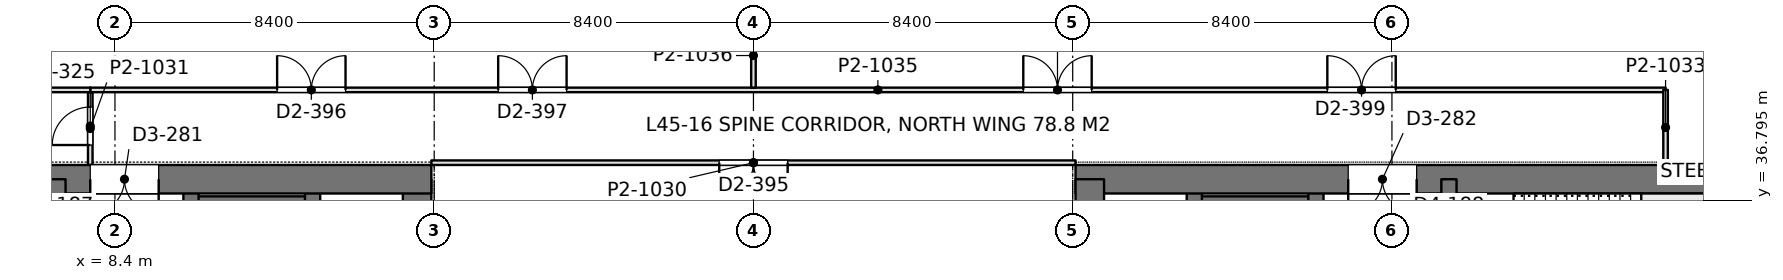
"""IFC4 building model, lengths in metres.
Left out: names, types, materials, properties, quantities, classifications, styles, units other than length and angle.
Written with IfcOpenShell. Run it as: python <this file> out.ifc"""

import sys

from ifc_helpers import new_model, si_unit, direction, frame, frame_2d, origin, place, context, subcontext, project, spatial, rectangle, extrude, element, fill, save


model = new_model("IFC4")
c1 = context("Model", 3, precision=1e-05, world=origin(), true_north=direction((0.0, 1.0)))
c2 = subcontext(c1, "Body", "Model", "MODEL_VIEW")
j1 = project(units=[si_unit("LENGTHUNIT", "METRE"), si_unit("PLANEANGLEUNIT", "RADIAN")], contexts=[c1])
p1 = place(None, origin())
s1 = spatial("IfcSite", under=j1, at=p1, CompositionType="ELEMENT")
p2 = place(p1, origin())
s2 = spatial("IfcBuilding", under=s1, at=p2, CompositionType="ELEMENT")
p3 = place(p2, frame((0.0, 0.0, 198.6)))
s3 = spatial("IfcBuildingStorey", under=s2, at=p3, CompositionType="ELEMENT", Elevation=198.6)
p4 = place(p3, frame((-1.125, 37.35, 0.0), z_axis=(0.0, 0.0, 1.0), x_axis=(1.0, 0.0, 0.0)))
e1 = element("IfcWall", 1, at=p4, inside=s3, PredefinedType="SHEAR", context=c2, shape_type="SweptSolid", body=[
    extrude(rectangle(XDim=17.85, YDim=0.75, at=frame_2d((8.925, 0.0))), origin(), (0.0, 0.0, 1.0), 4.2),
])
p5 = place(p4, frame((8.875, 0.0, 0.0)))
e2 = element("IfcOpeningElement", 2, at=p5, cuts=e1, PredefinedType="OPENING", context=c2, shape_type="SweptSolid", body=[
    extrude(rectangle(XDim=1.8, YDim=2.4, at=frame_2d((0.9, 1.2))), frame((0.0, 0.385, 0.0), z_axis=(0.0, -1.0, 0.0), x_axis=(1.0, 0.0, 0.0)), (0.0, 0.0, 1.0), 0.77),
])
p6 = place(p3, frame((16.35, 27.8, 0.0), z_axis=(0.0, 0.0, 1.0), x_axis=(0.0, 1.0, 0.0)))
e3 = element("IfcWall", 3, at=p6, inside=s3, PredefinedType="SHEAR", context=c2, shape_type="SweptSolid", body=[
    extrude(rectangle(XDim=9.55, YDim=0.75, at=frame_2d((4.775, 0.0))), origin(), (0.0, 0.0, 1.0), 4.2),
])
p7 = place(p3, frame((6.9, 13.05, 0.0), z_axis=(0.0, 0.0, 1.0), x_axis=(0.0, 1.0, 0.0)))
e4 = element("IfcWall", 4, at=p7, inside=s3, PredefinedType="SHEAR", context=c2, shape_type="SweptSolid", body=[
    extrude(rectangle(XDim=24.3, YDim=0.4, at=frame_2d((12.15, 0.0))), origin(), (0.0, 0.0, 1.0), 4.2),
])
p8 = place(p7, frame((1.3, 0.0, 0.0)))
e5 = element("IfcOpeningElement", 5, at=p8, cuts=e4, PredefinedType="OPENING", context=c2, shape_type="SweptSolid", body=[
    extrude(rectangle(XDim=1.0, YDim=2.2, at=frame_2d((0.5, 1.1))), frame((0.0, 0.21, 0.0), z_axis=(0.0, -1.0, 0.0), x_axis=(1.0, 0.0, 0.0)), (0.0, 0.0, 1.0), 0.42),
])
p9 = place(p7, frame((22.0, 0.0, 0.0)))
e6 = element("IfcOpeningElement", 6, at=p9, cuts=e4, PredefinedType="OPENING", context=c2, shape_type="SweptSolid", body=[
    extrude(rectangle(XDim=1.0, YDim=2.2, at=frame_2d((0.5, 1.1))), frame((0.0, 0.21, 0.0), z_axis=(0.0, -1.0, 0.0), x_axis=(1.0, 0.0, 0.0)), (0.0, 0.0, 1.0), 0.42),
])
p10 = place(p7, frame((5.55, 0.0, 0.0)))
e7 = element("IfcOpeningElement", 7, at=p10, cuts=e4, PredefinedType="OPENING", context=c2, shape_type="SweptSolid", body=[
    extrude(rectangle(XDim=1.0, YDim=2.2, at=frame_2d((0.5, 1.1))), frame((0.0, 0.21, 0.0), z_axis=(0.0, -1.0, 0.0), x_axis=(1.0, 0.0, 0.0)), (0.0, 0.0, 1.0), 0.42),
])
p11 = place(p7, frame((9.55, 0.0, 0.0)))
e8 = element("IfcOpeningElement", 8, at=p11, cuts=e4, PredefinedType="OPENING", context=c2, shape_type="SweptSolid", body=[
    extrude(rectangle(XDim=1.0, YDim=2.2, at=frame_2d((0.5, 1.1))), frame((0.0, 0.21, 0.0), z_axis=(0.0, -1.0, 0.0), x_axis=(1.0, 0.0, 0.0)), (0.0, 0.0, 1.0), 0.42),
])
p12 = place(p7, frame((12.8, 0.0, 0.0)))
e9 = element("IfcOpeningElement", 9, at=p12, cuts=e4, PredefinedType="OPENING", context=c2, shape_type="SweptSolid", body=[
    extrude(rectangle(XDim=1.1, YDim=2.2, at=frame_2d((0.55, 1.1))), frame((0.0, 0.21, 0.0), z_axis=(0.0, -1.0, 0.0), x_axis=(1.0, 0.0, 0.0)), (0.0, 0.0, 1.0), 0.42),
])
p13 = place(p7, frame((15.538, 0.0, 0.0)))
e10 = element("IfcOpeningElement", 10, at=p13, cuts=e4, PredefinedType="OPENING", context=c2, shape_type="SweptSolid", body=[
    extrude(rectangle(XDim=1.1, YDim=2.2, at=frame_2d((0.55, 1.1))), frame((0.0, 0.21, 0.0), z_axis=(0.0, -1.0, 0.0), x_axis=(1.0, 0.0, 0.0)), (0.0, 0.0, 1.0), 0.42),
])
p14 = place(p7, frame((18.262, 0.0, 0.0)))
e11 = element("IfcOpeningElement", 11, at=p14, cuts=e4, PredefinedType="OPENING", context=c2, shape_type="SweptSolid", body=[
    extrude(rectangle(XDim=1.1, YDim=2.2, at=frame_2d((0.55, 1.1))), frame((0.0, 0.21, 0.0), z_axis=(0.0, -1.0, 0.0), x_axis=(1.0, 0.0, 0.0)), (0.0, 0.0, 1.0), 0.42),
])
p15 = place(p3, frame((10.4, 13.05, 0.0), z_axis=(0.0, 0.0, 1.0), x_axis=(0.0, 1.0, 0.0)))
e12 = element("IfcWall", 12, at=p15, inside=s3, PredefinedType="SHEAR", context=c2, shape_type="SweptSolid", body=[
    extrude(rectangle(XDim=24.3, YDim=0.4, at=frame_2d((12.15, 0.0))), origin(), (0.0, 0.0, 1.0), 4.2),
])
p16 = place(p15, frame((15.75, 0.0, 0.0)))
e13 = element("IfcOpeningElement", 13, at=p16, cuts=e12, PredefinedType="OPENING", context=c2, shape_type="SweptSolid", body=[
    extrude(rectangle(XDim=1.1, YDim=2.2, at=frame_2d((0.55, 1.1))), frame((0.0, 0.21, 0.0), z_axis=(0.0, -1.0, 0.0), x_axis=(1.0, 0.0, 0.0)), (0.0, 0.0, 1.0), 0.42),
])
p17 = place(p15, frame((18.6, 0.0, 0.0)))
e14 = element("IfcOpeningElement", 14, at=p17, cuts=e12, PredefinedType="OPENING", context=c2, shape_type="SweptSolid", body=[
    extrude(rectangle(XDim=1.1, YDim=2.2, at=frame_2d((0.55, 1.1))), frame((0.0, 0.21, 0.0), z_axis=(0.0, -1.0, 0.0), x_axis=(1.0, 0.0, 0.0)), (0.0, 0.0, 1.0), 0.42),
])
p18 = place(p15, frame((21.45, 0.0, 0.0)))
e15 = element("IfcOpeningElement", 15, at=p18, cuts=e12, PredefinedType="OPENING", context=c2, shape_type="SweptSolid", body=[
    extrude(rectangle(XDim=1.1, YDim=2.2, at=frame_2d((0.55, 1.1))), frame((0.0, 0.21, 0.0), z_axis=(0.0, -1.0, 0.0), x_axis=(1.0, 0.0, 0.0)), (0.0, 0.0, 1.0), 0.42),
])
p19 = place(p15, frame((6.05, 0.0, 0.0)))
e16 = element("IfcOpeningElement", 16, at=p19, cuts=e12, PredefinedType="OPENING", context=c2, shape_type="SweptSolid", body=[
    extrude(rectangle(XDim=1.8, YDim=2.4, at=frame_2d((0.9, 1.2))), frame((0.0, 0.21, 0.0), z_axis=(0.0, -1.0, 0.0), x_axis=(1.0, 0.0, 0.0)), (0.0, 0.0, 1.0), 0.42),
])
p20 = place(p15, frame((11.25, 0.0, 0.0)))
e17 = element("IfcOpeningElement", 17, at=p20, cuts=e12, PredefinedType="OPENING", context=c2, shape_type="SweptSolid", body=[
    extrude(rectangle(XDim=1.8, YDim=2.4, at=frame_2d((0.9, 1.2))), frame((0.0, 0.21, 0.0), z_axis=(0.0, -1.0, 0.0), x_axis=(1.0, 0.0, 0.0)), (0.0, 0.0, 1.0), 0.42),
])
p21 = place(p3, frame((13.6, 27.925, 0.0), z_axis=(0.0, 0.0, 1.0), x_axis=(0.0, 1.0, 0.0)))
e18 = element("IfcWall", 18, at=p21, inside=s3, PredefinedType="SHEAR", context=c2, shape_type="SweptSolid", body=[
    extrude(rectangle(XDim=9.425, YDim=0.4, at=frame_2d((4.712, 0.0))), origin(), (0.0, 0.0, 1.0), 4.2),
])
p22 = place(p3, frame((10.4, 36.625, 0.0), z_axis=(0.0, 0.0, 1.0), x_axis=(1.0, 0.0, 0.0)))
e19 = element("IfcWall", 19, at=p22, inside=s3, PredefinedType="SHEAR", context=c2, shape_type="SweptSolid", body=[
    extrude(rectangle(XDim=3.2, YDim=0.55, at=frame_2d((1.6, 0.0))), origin(), (0.0, 0.0, 1.0), 4.2),
])
p23 = place(p3, frame((33.675, 37.35, 0.0), z_axis=(0.0, 0.0, 1.0), x_axis=(1.0, 0.0, 0.0)))
e20 = element("IfcWall", 20, at=p23, inside=s3, PredefinedType="SHEAR", context=c2, shape_type="SweptSolid", body=[
    extrude(rectangle(XDim=17.85, YDim=0.75, at=frame_2d((8.925, 0.0))), origin(), (0.0, 0.0, 1.0), 4.2),
])
p24 = place(p23, frame((7.175, 0.0, 0.0)))
e21 = element("IfcOpeningElement", 21, at=p24, cuts=e20, PredefinedType="OPENING", context=c2, shape_type="SweptSolid", body=[
    extrude(rectangle(XDim=1.8, YDim=2.4, at=frame_2d((0.9, 1.2))), frame((0.0, 0.385, 0.0), z_axis=(0.0, -1.0, 0.0), x_axis=(1.0, 0.0, 0.0)), (0.0, 0.0, 1.0), 0.77),
])
p25 = place(p3, frame((34.05, 27.8, 0.0), z_axis=(0.0, 0.0, 1.0), x_axis=(0.0, 1.0, 0.0)))
e22 = element("IfcWall", 22, at=p25, inside=s3, PredefinedType="SHEAR", context=c2, shape_type="SweptSolid", body=[
    extrude(rectangle(XDim=9.55, YDim=0.75, at=frame_2d((4.775, 0.0))), origin(), (0.0, 0.0, 1.0), 4.2),
])
p26 = place(p3, frame((43.5, 13.05, 0.0), z_axis=(0.0, 0.0, 1.0), x_axis=(0.0, 1.0, 0.0)))
e23 = element("IfcWall", 23, at=p26, inside=s3, PredefinedType="SHEAR", context=c2, shape_type="SweptSolid", body=[
    extrude(rectangle(XDim=24.3, YDim=0.4, at=frame_2d((12.15, 0.0))), origin(), (0.0, 0.0, 1.0), 4.2),
])
p27 = place(p26, frame((1.3, 0.0, 0.0)))
e24 = element("IfcOpeningElement", 24, at=p27, cuts=e23, PredefinedType="OPENING", context=c2, shape_type="SweptSolid", body=[
    extrude(rectangle(XDim=1.0, YDim=2.2, at=frame_2d((0.5, 1.1))), frame((0.0, 0.21, 0.0), z_axis=(0.0, -1.0, 0.0), x_axis=(1.0, 0.0, 0.0)), (0.0, 0.0, 1.0), 0.42),
])
p28 = place(p26, frame((22.0, 0.0, 0.0)))
e25 = element("IfcOpeningElement", 25, at=p28, cuts=e23, PredefinedType="OPENING", context=c2, shape_type="SweptSolid", body=[
    extrude(rectangle(XDim=1.0, YDim=2.2, at=frame_2d((0.5, 1.1))), frame((0.0, 0.21, 0.0), z_axis=(0.0, -1.0, 0.0), x_axis=(1.0, 0.0, 0.0)), (0.0, 0.0, 1.0), 0.42),
])
p29 = place(p26, frame((5.55, 0.0, 0.0)))
e26 = element("IfcOpeningElement", 26, at=p29, cuts=e23, PredefinedType="OPENING", context=c2, shape_type="SweptSolid", body=[
    extrude(rectangle(XDim=1.0, YDim=2.2, at=frame_2d((0.5, 1.1))), frame((0.0, 0.21, 0.0), z_axis=(0.0, -1.0, 0.0), x_axis=(1.0, 0.0, 0.0)), (0.0, 0.0, 1.0), 0.42),
])
p30 = place(p26, frame((9.55, 0.0, 0.0)))
e27 = element("IfcOpeningElement", 27, at=p30, cuts=e23, PredefinedType="OPENING", context=c2, shape_type="SweptSolid", body=[
    extrude(rectangle(XDim=1.0, YDim=2.2, at=frame_2d((0.5, 1.1))), frame((0.0, 0.21, 0.0), z_axis=(0.0, -1.0, 0.0), x_axis=(1.0, 0.0, 0.0)), (0.0, 0.0, 1.0), 0.42),
])
p31 = place(p26, frame((12.8, 0.0, 0.0)))
e28 = element("IfcOpeningElement", 28, at=p31, cuts=e23, PredefinedType="OPENING", context=c2, shape_type="SweptSolid", body=[
    extrude(rectangle(XDim=1.1, YDim=2.2, at=frame_2d((0.55, 1.1))), frame((0.0, 0.21, 0.0), z_axis=(0.0, -1.0, 0.0), x_axis=(1.0, 0.0, 0.0)), (0.0, 0.0, 1.0), 0.42),
])
p32 = place(p26, frame((15.538, 0.0, 0.0)))
e29 = element("IfcOpeningElement", 29, at=p32, cuts=e23, PredefinedType="OPENING", context=c2, shape_type="SweptSolid", body=[
    extrude(rectangle(XDim=1.1, YDim=2.2, at=frame_2d((0.55, 1.1))), frame((0.0, 0.21, 0.0), z_axis=(0.0, -1.0, 0.0), x_axis=(1.0, 0.0, 0.0)), (0.0, 0.0, 1.0), 0.42),
])
p33 = place(p26, frame((18.262, 0.0, 0.0)))
e30 = element("IfcOpeningElement", 30, at=p33, cuts=e23, PredefinedType="OPENING", context=c2, shape_type="SweptSolid", body=[
    extrude(rectangle(XDim=1.1, YDim=2.2, at=frame_2d((0.55, 1.1))), frame((0.0, 0.21, 0.0), z_axis=(0.0, -1.0, 0.0), x_axis=(1.0, 0.0, 0.0)), (0.0, 0.0, 1.0), 0.42),
])
p34 = place(p3, frame((40.0, 13.05, 0.0), z_axis=(0.0, 0.0, 1.0), x_axis=(0.0, 1.0, 0.0)))
e31 = element("IfcWall", 31, at=p34, inside=s3, PredefinedType="SHEAR", context=c2, shape_type="SweptSolid", body=[
    extrude(rectangle(XDim=24.3, YDim=0.4, at=frame_2d((12.15, 0.0))), origin(), (0.0, 0.0, 1.0), 4.2),
])
p35 = place(p34, frame((15.75, 0.0, 0.0)))
e32 = element("IfcOpeningElement", 32, at=p35, cuts=e31, PredefinedType="OPENING", context=c2, shape_type="SweptSolid", body=[
    extrude(rectangle(XDim=1.1, YDim=2.2, at=frame_2d((0.55, 1.1))), frame((0.0, 0.21, 0.0), z_axis=(0.0, -1.0, 0.0), x_axis=(1.0, 0.0, 0.0)), (0.0, 0.0, 1.0), 0.42),
])
p36 = place(p34, frame((18.6, 0.0, 0.0)))
e33 = element("IfcOpeningElement", 33, at=p36, cuts=e31, PredefinedType="OPENING", context=c2, shape_type="SweptSolid", body=[
    extrude(rectangle(XDim=1.1, YDim=2.2, at=frame_2d((0.55, 1.1))), frame((0.0, 0.21, 0.0), z_axis=(0.0, -1.0, 0.0), x_axis=(1.0, 0.0, 0.0)), (0.0, 0.0, 1.0), 0.42),
])
p37 = place(p34, frame((21.45, 0.0, 0.0)))
e34 = element("IfcOpeningElement", 34, at=p37, cuts=e31, PredefinedType="OPENING", context=c2, shape_type="SweptSolid", body=[
    extrude(rectangle(XDim=1.1, YDim=2.2, at=frame_2d((0.55, 1.1))), frame((0.0, 0.21, 0.0), z_axis=(0.0, -1.0, 0.0), x_axis=(1.0, 0.0, 0.0)), (0.0, 0.0, 1.0), 0.42),
])
p38 = place(p34, frame((6.05, 0.0, 0.0)))
e35 = element("IfcOpeningElement", 35, at=p38, cuts=e31, PredefinedType="OPENING", context=c2, shape_type="SweptSolid", body=[
    extrude(rectangle(XDim=1.8, YDim=2.4, at=frame_2d((0.9, 1.2))), frame((0.0, 0.21, 0.0), z_axis=(0.0, -1.0, 0.0), x_axis=(1.0, 0.0, 0.0)), (0.0, 0.0, 1.0), 0.42),
])
p39 = place(p34, frame((11.25, 0.0, 0.0)))
e36 = element("IfcOpeningElement", 36, at=p39, cuts=e31, PredefinedType="OPENING", context=c2, shape_type="SweptSolid", body=[
    extrude(rectangle(XDim=1.8, YDim=2.4, at=frame_2d((0.9, 1.2))), frame((0.0, 0.21, 0.0), z_axis=(0.0, -1.0, 0.0), x_axis=(1.0, 0.0, 0.0)), (0.0, 0.0, 1.0), 0.42),
])
p40 = place(p3, frame((36.8, 27.925, 0.0), z_axis=(0.0, 0.0, 1.0), x_axis=(0.0, 1.0, 0.0)))
e37 = element("IfcWall", 37, at=p40, inside=s3, PredefinedType="SHEAR", context=c2, shape_type="SweptSolid", body=[
    extrude(rectangle(XDim=9.425, YDim=0.4, at=frame_2d((4.712, 0.0))), origin(), (0.0, 0.0, 1.0), 4.2),
])
p41 = place(p3, frame((40.0, 36.625, 0.0), z_axis=(0.0, 0.0, 1.0), x_axis=(-1.0, 0.0, 0.0)))
e38 = element("IfcWall", 38, at=p41, inside=s3, PredefinedType="SHEAR", context=c2, shape_type="SweptSolid", body=[
    extrude(rectangle(XDim=3.2, YDim=0.55, at=frame_2d((1.6, 0.0))), origin(), (0.0, 0.0, 1.0), 4.2),
])
p42 = place(p3, frame((25.2, 39.758, 0.0), z_axis=(0.0, 0.0, 1.0), x_axis=(0.0, 1.0, 0.0)))
e39 = element("IfcWall", 39, at=p42, inside=s3, PredefinedType="PARTITIONING", context=c2, shape_type="SweptSolid", body=[
    extrude(rectangle(XDim=1.693, YDim=0.12, at=frame_2d((0.846, 0.0))), origin(), (0.0, 0.0, 1.0), 3.55),
])
p43 = place(p3, frame((7.748, 39.7, 0.0), z_axis=(0.0, 0.0, 1.0), x_axis=(1.0, 0.0, 0.0)))
e40 = element("IfcWall", 40, at=p43, inside=s3, PredefinedType="PARTITIONING", context=c2, shape_type="SweptSolid", body=[
    extrude(rectangle(XDim=41.452, YDim=0.12, at=frame_2d((20.726, 0.0))), origin(), (0.0, 0.0, 1.0), 3.55),
])
p44 = place(p43, frame((4.919, 0.0, 0.0)))
e41 = element("IfcOpeningElement", 41, at=p44, cuts=e40, PredefinedType="OPENING", context=c2, shape_type="SweptSolid", body=[
    extrude(rectangle(XDim=1.8, YDim=2.2, at=frame_2d((0.9, 1.1))), frame((0.0, 0.07, 0.0), z_axis=(0.0, -1.0, 0.0), x_axis=(1.0, 0.0, 0.0)), (0.0, 0.0, 1.0), 0.14),
])
p45 = place(p43, frame((10.735, 0.0, 0.0)))
e42 = element("IfcOpeningElement", 42, at=p45, cuts=e40, PredefinedType="OPENING", context=c2, shape_type="SweptSolid", body=[
    extrude(rectangle(XDim=1.8, YDim=2.2, at=frame_2d((0.9, 1.1))), frame((0.0, 0.07, 0.0), z_axis=(0.0, -1.0, 0.0), x_axis=(1.0, 0.0, 0.0)), (0.0, 0.0, 1.0), 0.14),
])
p46 = place(p43, frame((24.552, 0.0, 0.0)))
e43 = element("IfcOpeningElement", 43, at=p46, cuts=e40, PredefinedType="OPENING", context=c2, shape_type="SweptSolid", body=[
    extrude(rectangle(XDim=1.8, YDim=2.2, at=frame_2d((0.9, 1.1))), frame((0.0, 0.07, 0.0), z_axis=(0.0, -1.0, 0.0), x_axis=(1.0, 0.0, 0.0)), (0.0, 0.0, 1.0), 0.14),
])
p47 = place(p43, frame((32.552, 0.0, 0.0)))
e44 = element("IfcOpeningElement", 44, at=p47, cuts=e40, PredefinedType="OPENING", context=c2, shape_type="SweptSolid", body=[
    extrude(rectangle(XDim=1.8, YDim=2.2, at=frame_2d((0.9, 1.1))), frame((0.0, 0.07, 0.0), z_axis=(0.0, -1.0, 0.0), x_axis=(1.0, 0.0, 0.0)), (0.0, 0.0, 1.0), 0.14),
])
p48 = place(p3, frame((7.75, 37.724, 0.0), z_axis=(0.0, 0.0, 1.0), x_axis=(0.0, 1.0, 0.0)))
e45 = element("IfcWall", 45, at=p48, inside=s3, PredefinedType="PARTITIONING", context=c2, shape_type="SweptSolid", body=[
    extrude(rectangle(XDim=1.918, YDim=0.12, at=frame_2d((0.959, 0.0))), origin(), (0.0, 0.0, 1.0), 4.05),
])
p49 = place(p48, frame((0.526, 0.0, 0.0)))
e46 = element("IfcOpeningElement", 46, at=p49, cuts=e45, PredefinedType="OPENING", context=c2, shape_type="SweptSolid", body=[
    extrude(rectangle(XDim=1.0, YDim=2.4, at=frame_2d((0.5, 1.2))), frame((0.0, 0.07, 0.0), z_axis=(0.0, -1.0, 0.0), x_axis=(1.0, 0.0, 0.0)), (0.0, 0.0, 1.0), 0.14),
])
p50 = place(p3, frame((49.2, 37.724, 0.0), z_axis=(0.0, 0.0, 1.0), x_axis=(0.0, 1.0, 0.0)))
e47 = element("IfcWall", 47, at=p50, inside=s3, PredefinedType="PARTITIONING", context=c2, shape_type="SweptSolid", body=[
    extrude(rectangle(XDim=1.976, YDim=0.12, at=frame_2d((0.988, 0.0))), origin(), (0.0, 0.0, 1.0), 4.05),
])
p51 = place(p3, frame((1.2, 39.7, 0.0), z_axis=(0.0, 0.0, 1.0), x_axis=(1.0, 0.0, 0.0)))
e48 = element("IfcWall", 48, at=p51, inside=s3, PredefinedType="PARTITIONING", context=c2, shape_type="SweptSolid", body=[
    extrude(rectangle(XDim=6.552, YDim=0.12, at=frame_2d((3.276, 0.0))), origin(), (0.0, 0.0, 1.0), 3.69),
])
p52 = place(p3, frame((16.725, 37.785, 0.0), z_axis=(0.0, 0.0, 1.0), x_axis=(1.0, 0.0, 0.0)))
e49 = element("IfcWall", 49, at=p52, inside=s3, PredefinedType="PARTITIONING", context=c2, shape_type="SweptSolid", body=[
    extrude(rectangle(XDim=16.95, YDim=0.12, at=frame_2d((8.475, 0.0))), origin(), (0.0, 0.0, 1.0), 3.55),
])
p53 = place(p52, frame((7.575, 0.0, 0.0)))
e50 = element("IfcOpeningElement", 50, at=p53, cuts=e49, PredefinedType="OPENING", context=c2, shape_type="SweptSolid", body=[
    extrude(rectangle(XDim=1.8, YDim=2.2, at=frame_2d((0.9, 1.1))), frame((0.0, 0.07, 0.0), z_axis=(0.0, -1.0, 0.0), x_axis=(1.0, 0.0, 0.0)), (0.0, 0.0, 1.0), 0.14),
])
p54 = place(p5, frame((1.8, 0.0, 0.0), z_axis=(0.0, 0.0, 1.0), x_axis=(-1.0, 0.0, 0.0)))
e51 = element("IfcDoor", 51, at=p54, inside=s3, OperationType="DOUBLE_DOOR_SINGLE_SWING", PredefinedType="DOOR", context=c2, shape_type="SweptSolid", body=[
    extrude(rectangle(XDim=1.8, YDim=2.4, at=frame_2d((0.9, 1.2))), frame((0.0, 0.025, 0.0), z_axis=(0.0, -1.0, 0.0), x_axis=(1.0, 0.0, 0.0)), (0.0, 0.0, 1.0), 0.05),
])
fill(e2, e51)
p55 = place(p24, frame((1.8, 0.0, 0.0), z_axis=(0.0, 0.0, 1.0), x_axis=(-1.0, 0.0, 0.0)))
e52 = element("IfcDoor", 52, at=p55, inside=s3, OperationType="DOUBLE_DOOR_SINGLE_SWING", PredefinedType="DOOR", context=c2, shape_type="SweptSolid", body=[
    extrude(rectangle(XDim=1.8, YDim=2.4, at=frame_2d((0.9, 1.2))), frame((0.0, 0.025, 0.0), z_axis=(0.0, -1.0, 0.0), x_axis=(1.0, 0.0, 0.0)), (0.0, 0.0, 1.0), 0.05),
])
fill(e21, e52)
p56 = place(p44, origin())
e53 = element("IfcDoor", 53, at=p56, inside=s3, OperationType="DOUBLE_DOOR_SINGLE_SWING", PredefinedType="DOOR", context=c2, shape_type="SweptSolid", body=[
    extrude(rectangle(XDim=1.8, YDim=2.2, at=frame_2d((0.9, 1.1))), frame((0.0, 0.025, 0.0), z_axis=(0.0, -1.0, 0.0), x_axis=(1.0, 0.0, 0.0)), (0.0, 0.0, 1.0), 0.05),
])
fill(e41, e53)
p57 = place(p45, origin())
e54 = element("IfcDoor", 54, at=p57, inside=s3, OperationType="DOUBLE_DOOR_SINGLE_SWING", PredefinedType="DOOR", context=c2, shape_type="SweptSolid", body=[
    extrude(rectangle(XDim=1.8, YDim=2.2, at=frame_2d((0.9, 1.1))), frame((0.0, 0.025, 0.0), z_axis=(0.0, -1.0, 0.0), x_axis=(1.0, 0.0, 0.0)), (0.0, 0.0, 1.0), 0.05),
])
fill(e42, e54)
p58 = place(p46, origin())
e55 = element("IfcDoor", 55, at=p58, inside=s3, OperationType="DOUBLE_DOOR_SINGLE_SWING", PredefinedType="DOOR", context=c2, shape_type="SweptSolid", body=[
    extrude(rectangle(XDim=1.8, YDim=2.2, at=frame_2d((0.9, 1.1))), frame((0.0, 0.025, 0.0), z_axis=(0.0, -1.0, 0.0), x_axis=(1.0, 0.0, 0.0)), (0.0, 0.0, 1.0), 0.05),
])
fill(e43, e55)
p59 = place(p47, origin())
e56 = element("IfcDoor", 56, at=p59, inside=s3, OperationType="DOUBLE_DOOR_SINGLE_SWING", PredefinedType="DOOR", context=c2, shape_type="SweptSolid", body=[
    extrude(rectangle(XDim=1.8, YDim=2.2, at=frame_2d((0.9, 1.1))), frame((0.0, 0.025, 0.0), z_axis=(0.0, -1.0, 0.0), x_axis=(1.0, 0.0, 0.0)), (0.0, 0.0, 1.0), 0.05),
])
fill(e44, e56)
p60 = place(p49, origin())
e57 = element("IfcDoor", 57, at=p60, inside=s3, OperationType="SINGLE_SWING_LEFT", PredefinedType="DOOR", context=c2, shape_type="SweptSolid", body=[
    extrude(rectangle(XDim=1.0, YDim=2.4, at=frame_2d((0.5, 1.2))), frame((0.0, 0.025, 0.0), z_axis=(0.0, -1.0, 0.0), x_axis=(1.0, 0.0, 0.0)), (0.0, 0.0, 1.0), 0.05),
])
fill(e46, e57)
p61 = place(p53, frame((1.8, 0.0, 0.0), z_axis=(0.0, 0.0, 1.0), x_axis=(-1.0, 0.0, 0.0)))
e58 = element("IfcDoor", 58, at=p61, inside=s3, OperationType="DOUBLE_DOOR_SINGLE_SWING", PredefinedType="DOOR", context=c2, shape_type="SweptSolid", body=[
    extrude(rectangle(XDim=1.8, YDim=2.2, at=frame_2d((0.9, 1.1))), frame((0.0, 0.025, 0.0), z_axis=(0.0, -1.0, 0.0), x_axis=(1.0, 0.0, 0.0)), (0.0, 0.0, 1.0), 0.05),
])
fill(e50, e58)
save(model, sys.argv[1])
